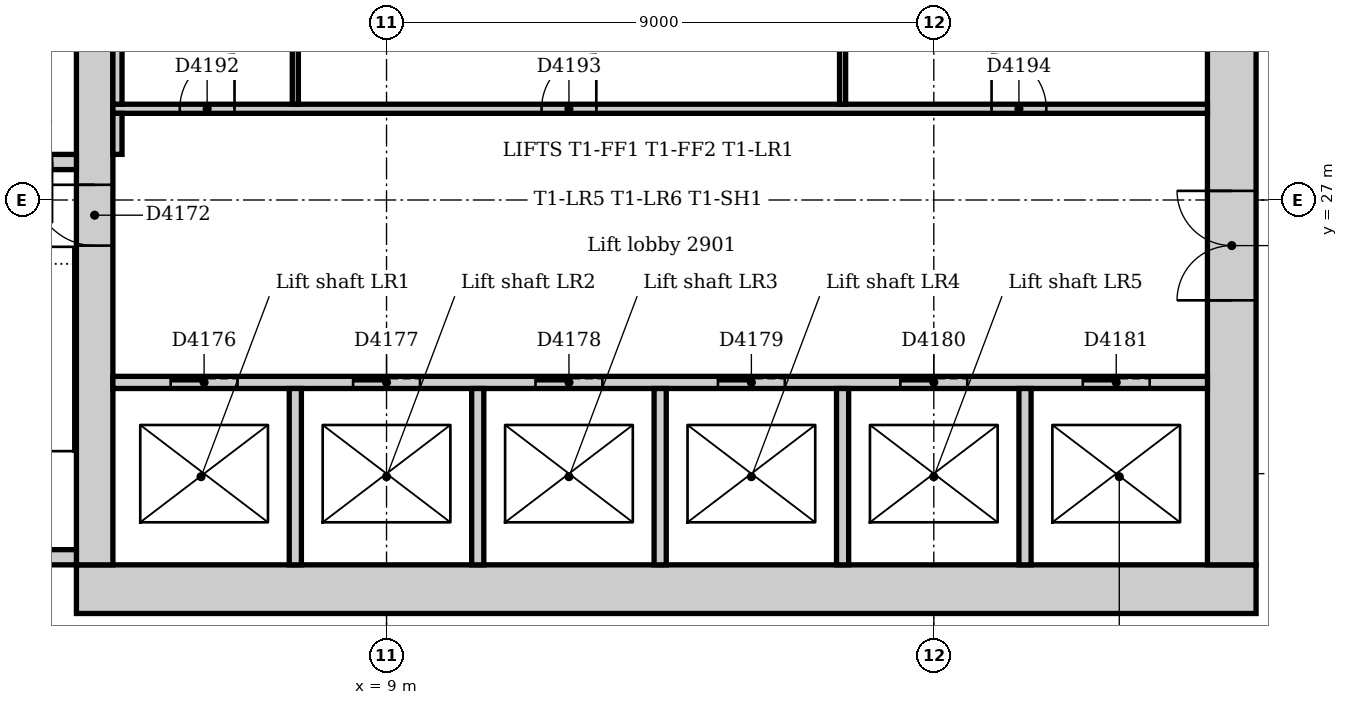
"""IFC4 building model, lengths in metres.
Left out: names, types, materials, properties, quantities, classifications, styles, units other than length and angle.
Written with IfcOpenShell. Run it as: python <this file> out.ifc"""

import sys

from ifc_helpers import new_model, si_unit, direction, frame, frame_2d, origin, place, context, subcontext, project, spatial, rectangle, extrude, element, fill, save


model = new_model("IFC4")
c1 = context("Model", 3, precision=1e-05, world=origin(), true_north=direction((0.0, 1.0)))
c2 = subcontext(c1, "Body", "Model", "MODEL_VIEW")
j1 = project(units=[si_unit("LENGTHUNIT", "METRE"), si_unit("PLANEANGLEUNIT", "RADIAN")], contexts=[c1])
p1 = place(None, origin())
s1 = spatial("IfcSite", under=j1, at=p1, CompositionType="ELEMENT")
p2 = place(p1, origin())
s2 = spatial("IfcBuilding", under=s1, at=p2, CompositionType="ELEMENT")
p3 = place(p2, frame((0.0, 0.0, 124.0)))
s3 = spatial("IfcBuildingStorey", under=s2, at=p3, CompositionType="ELEMENT", Elevation=124.0)
p4 = place(p3, frame((3.9, 20.6, 0.0), z_axis=(0.0, 0.0, 1.0), x_axis=(1.0, 0.0, 0.0)))
e1 = element("IfcWall", 1, at=p4, inside=s3, PredefinedType="SOLIDWALL", context=c2, shape_type="SweptSolid", body=[
    extrude(rectangle(XDim=19.4, YDim=0.8, at=frame_2d((9.7, 0.0))), origin(), (0.0, 0.0, 1.0), 4.0),
])
p5 = place(p3, frame((22.9, 21.0, 0.0), z_axis=(0.0, 0.0, 1.0), x_axis=(0.0, 1.0, 0.0)))
e2 = element("IfcWall", 2, at=p5, inside=s3, PredefinedType="SOLIDWALL", context=c2, shape_type="SweptSolid", body=[
    extrude(rectangle(XDim=10.5, YDim=0.8, at=frame_2d((5.25, 0.0))), origin(), (0.0, 0.0, 1.0), 4.0),
])
p6 = place(p5, frame((4.35, 0.0, 0.0)))
e3 = element("IfcOpeningElement", 3, at=p6, cuts=e2, PredefinedType="OPENING", context=c2, shape_type="SweptSolid", body=[
    extrude(rectangle(XDim=1.8, YDim=2.1, at=frame_2d((0.9, 1.05))), frame((0.0, 0.41, 0.0), z_axis=(0.0, -1.0, 0.0), x_axis=(1.0, 0.0, 0.0)), (0.0, 0.0, 1.0), 0.82),
])
p7 = place(p3, frame((4.2, 31.5, 0.0), z_axis=(0.0, 0.0, 1.0), x_axis=(0.0, -1.0, 0.0)))
e4 = element("IfcWall", 4, at=p7, inside=s3, PredefinedType="SOLIDWALL", context=c2, shape_type="SweptSolid", body=[
    extrude(rectangle(XDim=10.5, YDim=0.6, at=frame_2d((5.25, 0.0))), origin(), (0.0, 0.0, 1.0), 4.0),
])
p8 = place(p7, frame((4.25, 0.0, 0.0)))
e5 = element("IfcOpeningElement", 5, at=p8, cuts=e4, PredefinedType="OPENING", context=c2, shape_type="SweptSolid", body=[
    extrude(rectangle(XDim=1.0, YDim=2.1, at=frame_2d((0.5, 1.05))), frame((0.0, 0.31, 0.0), z_axis=(0.0, -1.0, 0.0), x_axis=(1.0, 0.0, 0.0)), (0.0, 0.0, 1.0), 0.62),
])
p9 = place(p3, frame((0.36, 21.125, 0.0), z_axis=(0.0, 0.0, 1.0), x_axis=(1.0, 0.0, 0.0)))
e6 = element("IfcWall", 6, at=p9, inside=s3, PredefinedType="SOLIDWALL", context=c2, shape_type="SweptSolid", body=[
    extrude(rectangle(XDim=3.54, YDim=0.25, at=frame_2d((1.77, 0.0))), origin(), (0.0, 0.0, 1.0), 4.0),
])
p10 = place(p3, frame((3.9, 27.625, 0.0), z_axis=(0.0, 0.0, 1.0), x_axis=(-1.0, 0.0, 0.0)))
e7 = element("IfcWall", 7, at=p10, inside=s3, PredefinedType="SOLIDWALL", context=c2, shape_type="SweptSolid", body=[
    extrude(rectangle(XDim=3.54, YDim=0.25, at=frame_2d((1.77, 0.0))), origin(), (0.0, 0.0, 1.0), 4.0),
])
p11 = place(p10, frame((0.4, 0.0, 0.0)))
e8 = element("IfcOpeningElement", 8, at=p11, cuts=e7, PredefinedType="OPENING", context=c2, shape_type="SweptSolid", body=[
    extrude(rectangle(XDim=1.0, YDim=2.1, at=frame_2d((0.5, 1.05))), frame((0.0, 0.135, 0.0), z_axis=(0.0, -1.0, 0.0), x_axis=(1.0, 0.0, 0.0)), (0.0, 0.0, 1.0), 0.27),
])
p12 = place(p3, frame((4.5, 24.0, 0.0), z_axis=(0.0, 0.0, 1.0), x_axis=(1.0, 0.0, 0.0)))
e9 = element("IfcWall", 9, at=p12, inside=s3, PredefinedType="PARTITIONING", context=c2, shape_type="SweptSolid", body=[
    extrude(rectangle(XDim=18.0, YDim=0.2, at=frame_2d((9.0, 0.0))), origin(), (0.0, 0.0, 1.0), 3.85),
])
p13 = place(p12, frame((0.95, 0.0, 0.0)))
e10 = element("IfcOpeningElement", 10, at=p13, cuts=e9, PredefinedType="OPENING", context=c2, shape_type="SweptSolid", body=[
    extrude(rectangle(XDim=1.1, YDim=2.1, at=frame_2d((0.55, 1.05))), frame((0.0, 0.11, 0.0), z_axis=(0.0, -1.0, 0.0), x_axis=(1.0, 0.0, 0.0)), (0.0, 0.0, 1.0), 0.22),
])
p14 = place(p12, frame((3.95, 0.0, 0.0)))
e11 = element("IfcOpeningElement", 11, at=p14, cuts=e9, PredefinedType="OPENING", context=c2, shape_type="SweptSolid", body=[
    extrude(rectangle(XDim=1.1, YDim=2.1, at=frame_2d((0.55, 1.05))), frame((0.0, 0.11, 0.0), z_axis=(0.0, -1.0, 0.0), x_axis=(1.0, 0.0, 0.0)), (0.0, 0.0, 1.0), 0.22),
])
p15 = place(p12, frame((6.95, 0.0, 0.0)))
e12 = element("IfcOpeningElement", 12, at=p15, cuts=e9, PredefinedType="OPENING", context=c2, shape_type="SweptSolid", body=[
    extrude(rectangle(XDim=1.1, YDim=2.1, at=frame_2d((0.55, 1.05))), frame((0.0, 0.11, 0.0), z_axis=(0.0, -1.0, 0.0), x_axis=(1.0, 0.0, 0.0)), (0.0, 0.0, 1.0), 0.22),
])
p16 = place(p12, frame((9.95, 0.0, 0.0)))
e13 = element("IfcOpeningElement", 13, at=p16, cuts=e9, PredefinedType="OPENING", context=c2, shape_type="SweptSolid", body=[
    extrude(rectangle(XDim=1.1, YDim=2.1, at=frame_2d((0.55, 1.05))), frame((0.0, 0.11, 0.0), z_axis=(0.0, -1.0, 0.0), x_axis=(1.0, 0.0, 0.0)), (0.0, 0.0, 1.0), 0.22),
])
p17 = place(p12, frame((12.95, 0.0, 0.0)))
e14 = element("IfcOpeningElement", 14, at=p17, cuts=e9, PredefinedType="OPENING", context=c2, shape_type="SweptSolid", body=[
    extrude(rectangle(XDim=1.1, YDim=2.1, at=frame_2d((0.55, 1.05))), frame((0.0, 0.11, 0.0), z_axis=(0.0, -1.0, 0.0), x_axis=(1.0, 0.0, 0.0)), (0.0, 0.0, 1.0), 0.22),
])
p18 = place(p12, frame((15.95, 0.0, 0.0)))
e15 = element("IfcOpeningElement", 15, at=p18, cuts=e9, PredefinedType="OPENING", context=c2, shape_type="SweptSolid", body=[
    extrude(rectangle(XDim=1.1, YDim=2.1, at=frame_2d((0.55, 1.05))), frame((0.0, 0.11, 0.0), z_axis=(0.0, -1.0, 0.0), x_axis=(1.0, 0.0, 0.0)), (0.0, 0.0, 1.0), 0.22),
])
for number, where, z_axis, x_axis in (
    (16, (7.5, 21.0, 0.0), (0.0, 0.0, 1.0), (0.0, 1.0, 0.0)),
    (17, (10.5, 21.0, 0.0), (0.0, 0.0, 1.0), (0.0, 1.0, 0.0)),
    (18, (13.5, 21.0, 0.0), (0.0, 0.0, 1.0), (0.0, 1.0, 0.0)),
    (19, (16.5, 21.0, 0.0), (0.0, 0.0, 1.0), (0.0, 1.0, 0.0)),
    (20, (19.5, 21.0, 0.0), (0.0, 0.0, 1.0), (0.0, 1.0, 0.0)),
):
    element("IfcWall", number, at=place(p3, frame(where, z_axis=z_axis, x_axis=x_axis)), inside=s3, PredefinedType="PARTITIONING", context=c2, shape_type="SweptSolid", body=[
        extrude(rectangle(XDim=2.9, YDim=0.2, at=frame_2d((1.45, 0.0))), origin(), (0.0, 0.0, 1.0), 3.85),
    ])
p19 = place(p3, frame((4.5, 28.5, 0.0), z_axis=(0.0, 0.0, 1.0), x_axis=(1.0, 0.0, 0.0)))
e21 = element("IfcWall", 21, at=p19, inside=s3, PredefinedType="PARTITIONING", context=c2, shape_type="SweptSolid", body=[
    extrude(rectangle(XDim=18.0, YDim=0.15, at=frame_2d((9.0, 0.0))), origin(), (0.0, 0.0, 1.0), 3.85),
])
p20 = place(p19, frame((1.1, 0.0, 0.0)))
e22 = element("IfcOpeningElement", 22, at=p20, cuts=e21, PredefinedType="OPENING", context=c2, shape_type="SweptSolid", body=[
    extrude(rectangle(XDim=0.9, YDim=2.1, at=frame_2d((0.45, 1.05))), frame((0.0, 0.085, 0.0), z_axis=(0.0, -1.0, 0.0), x_axis=(1.0, 0.0, 0.0)), (0.0, 0.0, 1.0), 0.17),
])
p21 = place(p19, frame((7.05, 0.0, 0.0)))
e23 = element("IfcOpeningElement", 23, at=p21, cuts=e21, PredefinedType="OPENING", context=c2, shape_type="SweptSolid", body=[
    extrude(rectangle(XDim=0.9, YDim=2.1, at=frame_2d((0.45, 1.05))), frame((0.0, 0.085, 0.0), z_axis=(0.0, -1.0, 0.0), x_axis=(1.0, 0.0, 0.0)), (0.0, 0.0, 1.0), 0.17),
])
p22 = place(p19, frame((14.45, 0.0, 0.0)))
e24 = element("IfcOpeningElement", 24, at=p22, cuts=e21, PredefinedType="OPENING", context=c2, shape_type="SweptSolid", body=[
    extrude(rectangle(XDim=0.9, YDim=2.1, at=frame_2d((0.45, 1.05))), frame((0.0, 0.085, 0.0), z_axis=(0.0, -1.0, 0.0), x_axis=(1.0, 0.0, 0.0)), (0.0, 0.0, 1.0), 0.17),
])
p23 = place(p3, frame((4.575, 27.75, 0.0), z_axis=(0.0, 0.0, 1.0), x_axis=(0.0, 1.0, 0.0)))
e25 = element("IfcWall", 25, at=p23, inside=s3, PredefinedType="PARTITIONING", context=c2, shape_type="SweptSolid", body=[
    extrude(rectangle(XDim=0.675, YDim=0.15, at=frame_2d((0.338, 0.0))), origin(), (0.0, 0.0, 1.0), 3.85),
])
p24 = place(p3, frame((4.575, 28.575, 0.0), z_axis=(0.0, 0.0, 1.0), x_axis=(0.0, 1.0, 0.0)))
e26 = element("IfcWall", 26, at=p24, inside=s3, PredefinedType="PARTITIONING", context=c2, shape_type="SweptSolid", body=[
    extrude(rectangle(XDim=2.675, YDim=0.15, at=frame_2d((1.337, 0.0))), origin(), (0.0, 0.0, 1.0), 3.85),
])
for number, where, z_axis, x_axis in (
    (27, (7.5, 28.575, 0.0), (0.0, 0.0, 1.0), (0.0, 1.0, 0.0)),
    (28, (16.5, 28.575, 0.0), (0.0, 0.0, 1.0), (0.0, 1.0, 0.0)),
):
    element("IfcWall", number, at=place(p3, frame(where, z_axis=z_axis, x_axis=x_axis)), inside=s3, PredefinedType="PARTITIONING", context=c2, shape_type="SweptSolid", body=[
        extrude(rectangle(XDim=2.675, YDim=0.1, at=frame_2d((1.337, 0.0))), origin(), (0.0, 0.0, 1.0), 3.85),
    ])
p25 = place(p8, frame((1.0, 0.0, 0.0), z_axis=(0.0, 0.0, 1.0), x_axis=(-1.0, 0.0, 0.0)))
e29 = element("IfcDoor", 29, at=p25, inside=s3, OperationType="SINGLE_SWING_RIGHT", PredefinedType="DOOR", context=c2, shape_type="SweptSolid", body=[
    extrude(rectangle(XDim=1.0, YDim=2.1, at=frame_2d((0.5, 1.05))), frame((0.0, 0.025, 0.0), z_axis=(0.0, -1.0, 0.0), x_axis=(1.0, 0.0, 0.0)), (0.0, 0.0, 1.0), 0.05),
])
fill(e5, e29)
p26 = place(p13, origin())
e30 = element("IfcDoor", 30, at=p26, inside=s3, OperationType="SLIDING_TO_LEFT", PredefinedType="DOOR", context=c2, shape_type="SweptSolid", body=[
    extrude(rectangle(XDim=1.1, YDim=2.1, at=frame_2d((0.55, 1.05))), frame((0.0, 0.025, 0.0), z_axis=(0.0, -1.0, 0.0), x_axis=(1.0, 0.0, 0.0)), (0.0, 0.0, 1.0), 0.05),
])
fill(e10, e30)
p27 = place(p14, origin())
e31 = element("IfcDoor", 31, at=p27, inside=s3, OperationType="SLIDING_TO_LEFT", PredefinedType="DOOR", context=c2, shape_type="SweptSolid", body=[
    extrude(rectangle(XDim=1.1, YDim=2.1, at=frame_2d((0.55, 1.05))), frame((0.0, 0.025, 0.0), z_axis=(0.0, -1.0, 0.0), x_axis=(1.0, 0.0, 0.0)), (0.0, 0.0, 1.0), 0.05),
])
fill(e11, e31)
p28 = place(p15, origin())
e32 = element("IfcDoor", 32, at=p28, inside=s3, OperationType="SLIDING_TO_LEFT", PredefinedType="DOOR", context=c2, shape_type="SweptSolid", body=[
    extrude(rectangle(XDim=1.1, YDim=2.1, at=frame_2d((0.55, 1.05))), frame((0.0, 0.025, 0.0), z_axis=(0.0, -1.0, 0.0), x_axis=(1.0, 0.0, 0.0)), (0.0, 0.0, 1.0), 0.05),
])
fill(e12, e32)
p29 = place(p16, origin())
e33 = element("IfcDoor", 33, at=p29, inside=s3, OperationType="SLIDING_TO_LEFT", PredefinedType="DOOR", context=c2, shape_type="SweptSolid", body=[
    extrude(rectangle(XDim=1.1, YDim=2.1, at=frame_2d((0.55, 1.05))), frame((0.0, 0.025, 0.0), z_axis=(0.0, -1.0, 0.0), x_axis=(1.0, 0.0, 0.0)), (0.0, 0.0, 1.0), 0.05),
])
fill(e13, e33)
p30 = place(p17, origin())
e34 = element("IfcDoor", 34, at=p30, inside=s3, OperationType="SLIDING_TO_LEFT", PredefinedType="DOOR", context=c2, shape_type="SweptSolid", body=[
    extrude(rectangle(XDim=1.1, YDim=2.1, at=frame_2d((0.55, 1.05))), frame((0.0, 0.025, 0.0), z_axis=(0.0, -1.0, 0.0), x_axis=(1.0, 0.0, 0.0)), (0.0, 0.0, 1.0), 0.05),
])
fill(e14, e34)
p31 = place(p18, origin())
e35 = element("IfcDoor", 35, at=p31, inside=s3, OperationType="SLIDING_TO_LEFT", PredefinedType="DOOR", context=c2, shape_type="SweptSolid", body=[
    extrude(rectangle(XDim=1.1, YDim=2.1, at=frame_2d((0.55, 1.05))), frame((0.0, 0.025, 0.0), z_axis=(0.0, -1.0, 0.0), x_axis=(1.0, 0.0, 0.0)), (0.0, 0.0, 1.0), 0.05),
])
fill(e15, e35)
p32 = place(p6, origin())
e36 = element("IfcDoor", 36, at=p32, inside=s3, OperationType="DOUBLE_DOOR_DOUBLE_SWING", PredefinedType="DOOR", context=c2, shape_type="SweptSolid", body=[
    extrude(rectangle(XDim=1.8, YDim=2.1, at=frame_2d((0.9, 1.05))), frame((0.0, 0.025, 0.0), z_axis=(0.0, -1.0, 0.0), x_axis=(1.0, 0.0, 0.0)), (0.0, 0.0, 1.0), 0.05),
])
fill(e3, e36)
p33 = place(p20, origin())
e37 = element("IfcDoor", 37, at=p33, inside=s3, OperationType="SINGLE_SWING_RIGHT", PredefinedType="DOOR", context=c2, shape_type="SweptSolid", body=[
    extrude(rectangle(XDim=0.9, YDim=2.1, at=frame_2d((0.45, 1.05))), frame((0.0, 0.025, 0.0), z_axis=(0.0, -1.0, 0.0), x_axis=(1.0, 0.0, 0.0)), (0.0, 0.0, 1.0), 0.05),
])
fill(e22, e37)
p34 = place(p21, origin())
e38 = element("IfcDoor", 38, at=p34, inside=s3, OperationType="SINGLE_SWING_RIGHT", PredefinedType="DOOR", context=c2, shape_type="SweptSolid", body=[
    extrude(rectangle(XDim=0.9, YDim=2.1, at=frame_2d((0.45, 1.05))), frame((0.0, 0.025, 0.0), z_axis=(0.0, -1.0, 0.0), x_axis=(1.0, 0.0, 0.0)), (0.0, 0.0, 1.0), 0.05),
])
fill(e23, e38)
p35 = place(p22, origin())
e39 = element("IfcDoor", 39, at=p35, inside=s3, OperationType="SINGLE_SWING_LEFT", PredefinedType="DOOR", context=c2, shape_type="SweptSolid", body=[
    extrude(rectangle(XDim=0.9, YDim=2.1, at=frame_2d((0.45, 1.05))), frame((0.0, 0.025, 0.0), z_axis=(0.0, -1.0, 0.0), x_axis=(1.0, 0.0, 0.0)), (0.0, 0.0, 1.0), 0.05),
])
fill(e24, e39)
save(model, sys.argv[1])
